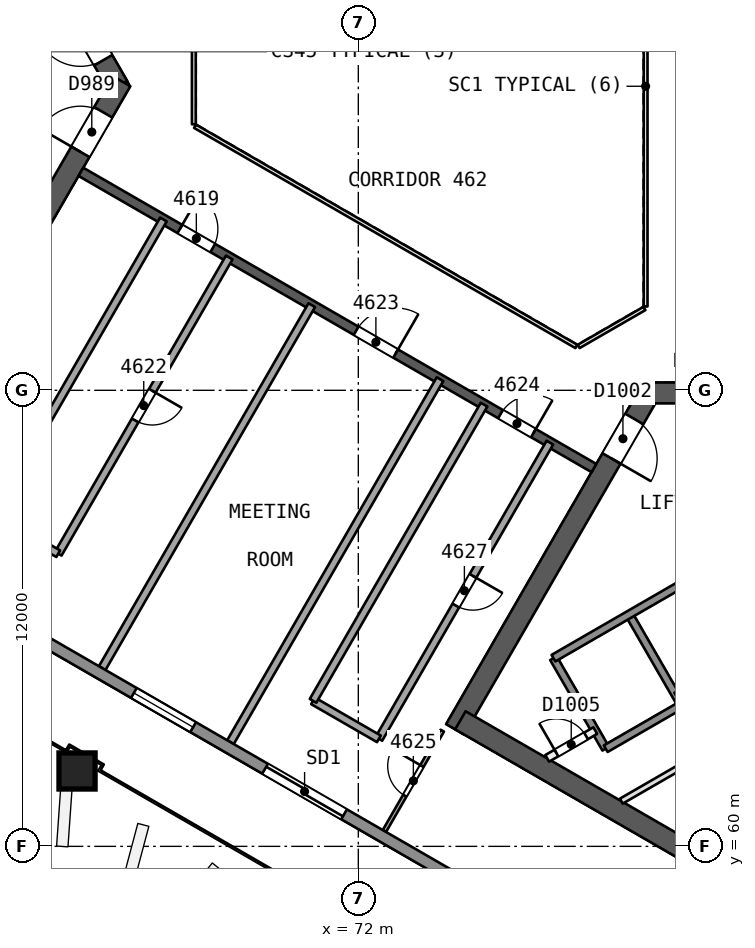
"""IFC4 building model, lengths in metres.
Left out: names, types, materials, properties, quantities, classifications, styles, units other than length and angle.
Written with IfcOpenShell. Run it as: python <this file> out.ifc"""

import sys

from ifc_helpers import new_model, si_unit, direction, frame, frame_2d, origin, origin_2d, place, context, subcontext, project, spatial, rectangle, extrude, element, fill, save


model = new_model("IFC4")
c1 = context("Model", 3, precision=1e-05, world=origin(), true_north=direction((0.0, 1.0)))
c2 = subcontext(c1, "Body", "Model", "MODEL_VIEW")
j1 = project(units=[si_unit("LENGTHUNIT", "METRE"), si_unit("PLANEANGLEUNIT", "RADIAN")], contexts=[c1])
p1 = place(None, origin())
s1 = spatial("IfcSite", under=j1, at=p1, CompositionType="ELEMENT")
p2 = place(p1, origin())
s2 = spatial("IfcBuilding", under=s1, at=p2, CompositionType="ELEMENT")
p3 = place(p2, frame((0.0, 0.0, 189.6)))
s3 = spatial("IfcBuildingStorey", under=s2, at=p3, CompositionType="ELEMENT", Elevation=189.6)
p4 = place(p3, frame((65.682, 80.0, 0.0), z_axis=(0.0, 0.0, 1.0), x_axis=(-0.500000202252, 0.866025287014, 0.0)))
e1 = element("IfcWall", 1, at=p4, inside=s3, PredefinedType="SHEAR", context=c2, shape_type="SweptSolid", body=[
    extrude(rectangle(XDim=10.221, YDim=0.55, at=frame_2d((5.111, 0.0))), origin(), (0.0, 0.0, 1.0), 3.7),
])
p5 = place(p4, frame((0.791, 0.0, 0.0)))
e2 = element("IfcOpeningElement", 2, at=p5, cuts=e1, PredefinedType="OPENING", context=c2, shape_type="SweptSolid", body=[
    extrude(rectangle(XDim=1.2, YDim=2.1, at=frame_2d((0.6, 1.05))), frame((0.0, 0.286, 0.0), z_axis=(0.0, -1.0, 0.0), x_axis=(1.0, 0.0, 0.0)), (0.0, 0.0, 1.0), 0.571),
])
p6 = place(p3, frame((60.709, 71.386, 0.0), z_axis=(0.0, 0.0, 1.0), x_axis=(0.500015938302, 0.866016201606, 0.0)))
e3 = element("IfcWall", 3, at=p6, inside=s3, PredefinedType="SHEAR", context=c2, shape_type="SweptSolid", body=[
    extrude(rectangle(XDim=10.105, YDim=0.55, at=frame_2d((5.053, 0.0))), origin(), (0.0, 0.0, 1.0), 3.7),
])
p7 = place(p6, frame((7.955, 0.0, 0.0)))
e4 = element("IfcOpeningElement", 4, at=p7, cuts=e3, PredefinedType="OPENING", context=c2, shape_type="SweptSolid", body=[
    extrude(rectangle(XDim=1.2, YDim=2.1, at=frame_2d((0.6, 1.05))), frame((0.0, 0.286, 0.0), z_axis=(0.0, -1.0, 0.0), x_axis=(1.0, 0.0, 0.0)), (0.0, 0.0, 1.0), 0.571),
])
p8 = place(p3, frame((79.659, 71.931, 0.0), z_axis=(0.0, 0.0, 1.0), x_axis=(-0.500000202252, -0.866025287014, 0.0)))
e5 = element("IfcWall", 5, at=p8, inside=s3, PredefinedType="SHEAR", context=c2, shape_type="SweptSolid", body=[
    extrude(rectangle(XDim=10.221, YDim=0.55, at=frame_2d((5.111, 0.0))), origin(), (0.0, 0.0, 1.0), 3.7),
])
p9 = place(p8, frame((0.791, 0.0, 0.0)))
e6 = element("IfcOpeningElement", 6, at=p9, cuts=e5, PredefinedType="OPENING", context=c2, shape_type="SweptSolid", body=[
    extrude(rectangle(XDim=1.2, YDim=2.1, at=frame_2d((0.6, 1.05))), frame((0.0, 0.286, 0.0), z_axis=(0.0, -1.0, 0.0), x_axis=(1.0, 0.0, 0.0)), (0.0, 0.0, 1.0), 0.571),
])
p10 = place(p3, frame((74.686, 63.317, 0.0), z_axis=(0.0, 0.0, 1.0), x_axis=(0.866024505738, -0.500001555459, 0.0)))
e7 = element("IfcWall", 7, at=p10, inside=s3, PredefinedType="SHEAR", context=c2, shape_type="SweptSolid", body=[
    extrude(rectangle(XDim=14.059, YDim=0.55, at=frame_2d((7.029, 0.0))), origin(), (0.0, 0.0, 1.0), 3.7),
])
p11 = place(p3, frame((89.605, 71.931, 0.0), z_axis=(0.0, 0.0, 1.0), x_axis=(-1.0, 0.0, 0.0)))
e8 = element("IfcWall", 8, at=p11, inside=s3, PredefinedType="SHEAR", context=c2, shape_type="SweptSolid", body=[
    extrude(rectangle(XDim=10.105, YDim=0.55, at=frame_2d((5.052, 0.0))), origin(), (0.0, 0.0, 1.0), 3.7),
])
p12 = place(p11, frame((7.955, 0.0, 0.0)))
e9 = element("IfcOpeningElement", 9, at=p12, cuts=e8, PredefinedType="OPENING", context=c2, shape_type="SweptSolid", body=[
    extrude(rectangle(XDim=1.2, YDim=2.1, at=frame_2d((0.6, 1.05))), frame((0.0, 0.286, 0.0), z_axis=(0.0, -1.0, 0.0), x_axis=(1.0, 0.0, 0.0)), (0.0, 0.0, 1.0), 0.571),
])
p13 = place(p3, frame((64.7, 77.748, 0.0), z_axis=(0.0, 0.0, 1.0), x_axis=(0.866026492143, -0.499998114903, 0.0)))
e10 = element("IfcWall", 10, at=p13, inside=s3, PredefinedType="SHEAR", context=c2, shape_type="SweptSolid", body=[
    extrude(rectangle(XDim=15.588, YDim=0.25, at=frame_2d((7.794, 0.0))), origin(), (0.0, 0.0, 1.0), 3.25),
])
p14 = place(p13, frame((3.007, 0.0, 0.0)))
e11 = element("IfcOpeningElement", 11, at=p14, cuts=e10, PredefinedType="OPENING", context=c2, shape_type="SweptSolid", body=[
    extrude(rectangle(XDim=1.0, YDim=2.1, at=frame_2d((0.5, 1.05))), frame((0.0, 0.135, 0.0), z_axis=(0.0, -1.0, 0.0), x_axis=(1.0, 0.0, 0.0)), (0.0, 0.0, 1.0), 0.271),
])
p15 = place(p13, frame((8.363, 0.0, 0.0)))
e12 = element("IfcOpeningElement", 12, at=p15, cuts=e10, PredefinedType="OPENING", context=c2, shape_type="SweptSolid", body=[
    extrude(rectangle(XDim=1.2, YDim=2.4, at=frame_2d((0.6, 1.2))), frame((0.0, 0.135, 0.0), z_axis=(0.0, -1.0, 0.0), x_axis=(1.0, 0.0, 0.0)), (0.0, 0.0, 1.0), 0.271),
])
p16 = place(p13, frame((12.75, 0.0, 0.0)))
e13 = element("IfcOpeningElement", 13, at=p16, cuts=e10, PredefinedType="OPENING", context=c2, shape_type="SweptSolid", body=[
    extrude(rectangle(XDim=1.0, YDim=2.1, at=frame_2d((0.5, 1.05))), frame((0.0, 0.135, 0.0), z_axis=(0.0, -1.0, 0.0), x_axis=(1.0, 0.0, 0.0)), (0.0, 0.0, 1.0), 0.271),
])
p17 = place(p3, frame((64.586, 61.963, 0.0), z_axis=(0.010093620709, 0.017482414954, 0.999796221231), x_axis=(-0.499912926478, -0.865840372083, 0.020187025823)))
e14 = element("IfcColumn", 14, at=p17, inside=s3, PredefinedType="COLUMN", context=c2, shape_type="SweptSolid", body=[
    extrude(rectangle(XDim=0.95, YDim=0.95, at=origin_2d()), origin(), (0.0, 0.0, 1.0), 3.701),
])
p18 = place(p3, frame((68.604, 75.495, 0.0), z_axis=(0.0, 0.0, 1.0), x_axis=(-0.5000018851, -0.866024315419, 0.0)))
e15 = element("IfcWall", 15, at=p18, inside=s3, PredefinedType="PARTITIONING", context=c2, shape_type="SweptSolid", body=[
    extrude(rectangle(XDim=9.0, YDim=0.2, at=frame_2d((4.5, 0.0))), origin(), (0.0, 0.0, 1.0), 3.25),
])
p19 = place(p18, frame((4.05, 0.0, 0.0)))
e16 = element("IfcOpeningElement", 16, at=p19, cuts=e15, PredefinedType="OPENING", context=c2, shape_type="SweptSolid", body=[
    extrude(rectangle(XDim=0.9, YDim=2.1, at=frame_2d((0.45, 1.05))), frame((0.0, 0.11, 0.0), z_axis=(0.0, -1.0, 0.0), x_axis=(1.0, 0.0, 0.0)), (0.0, 0.0, 1.0), 0.221),
])
p20 = place(p3, frame((64.104, 67.7, 0.0), z_axis=(0.0, 0.0, 1.0), x_axis=(-0.866010750942, 0.50002537861, 0.0)))
e17 = element("IfcWall", 17, at=p20, inside=s3, PredefinedType="PARTITIONING", context=c2, shape_type="SweptSolid", body=[
    extrude(rectangle(XDim=2.0, YDim=0.2, at=frame_2d((1.0, 0.0))), origin(), (0.0, 0.0, 1.0), 3.25),
])
p21 = place(p3, frame((62.372, 68.7, 0.0), z_axis=(0.0, 0.0, 1.0), x_axis=(0.5000018851, 0.866024315419, 0.0)))
e18 = element("IfcWall", 18, at=p21, inside=s3, PredefinedType="PARTITIONING", context=c2, shape_type="SweptSolid", body=[
    extrude(rectangle(XDim=9.0, YDim=0.2, at=frame_2d((4.5, 0.0))), origin(), (0.0, 0.0, 1.0), 3.25),
])
for number, where, z_axis, x_axis in (
    (19, (65.26, 64.69, 0.0), (0.0, 0.0, 1.0), (0.5, 0.866, 0.0)),
    (20, (68.635, 62.741, 0.0), (0.0, 0.0, 1.0), (0.5, 0.866, 0.0)),
):
    element("IfcWall", number, at=place(p3, frame(where, z_axis=z_axis, x_axis=x_axis)), inside=s3, PredefinedType="PARTITIONING", context=c2, shape_type="SweptSolid", body=[
        extrude(rectangle(XDim=11.029, YDim=0.2, at=frame_2d((5.514, 0.0))), origin(), (0.0, 0.0, 1.0), 3.25),
    ])
p22 = place(p3, frame((72.686, 60.403, 0.0), z_axis=(0.0, 0.0, 1.0), x_axis=(0.499978833458, 0.866037623948, 0.0)))
e21 = element("IfcWall", 21, at=p22, inside=s3, PredefinedType="PARTITIONING", context=c2, shape_type="SweptSolid", body=[
    extrude(rectangle(XDim=3.05, YDim=0.1, at=frame_2d((1.525, 0.0))), origin(), (0.0, 0.0, 1.0), 3.25),
])
p23 = place(p22, frame((1.075, 0.0, 0.0)))
e22 = element("IfcOpeningElement", 22, at=p23, cuts=e21, PredefinedType="OPENING", context=c2, shape_type="SweptSolid", body=[
    extrude(rectangle(XDim=0.9, YDim=2.1, at=frame_2d((0.45, 1.05))), frame((0.0, 0.061, 0.0), z_axis=(0.0, -1.0, 0.0), x_axis=(1.0, 0.0, 0.0)), (0.0, 0.0, 1.0), 0.121),
])
p24 = place(p3, frame((77.041, 70.623, 0.0), z_axis=(0.0, 0.0, 1.0), x_axis=(-0.5000018851, -0.866024315419, 0.0)))
e23 = element("IfcWall", 23, at=p24, inside=s3, PredefinedType="PARTITIONING", context=c2, shape_type="SweptSolid", body=[
    extrude(rectangle(XDim=9.0, YDim=0.2, at=frame_2d((4.5, 0.0))), origin(), (0.0, 0.0, 1.0), 3.25),
])
p25 = place(p24, frame((4.05, 0.0, 0.0)))
e24 = element("IfcOpeningElement", 24, at=p25, cuts=e23, PredefinedType="OPENING", context=c2, shape_type="SweptSolid", body=[
    extrude(rectangle(XDim=0.9, YDim=2.1, at=frame_2d((0.45, 1.05))), frame((0.0, 0.11, 0.0), z_axis=(0.0, -1.0, 0.0), x_axis=(1.0, 0.0, 0.0)), (0.0, 0.0, 1.0), 0.221),
])
p26 = place(p3, frame((72.541, 62.829, 0.0), z_axis=(0.0, 0.0, 1.0), x_axis=(-0.866010750942, 0.50002537861, 0.0)))
e25 = element("IfcWall", 25, at=p26, inside=s3, PredefinedType="PARTITIONING", context=c2, shape_type="SweptSolid", body=[
    extrude(rectangle(XDim=2.0, YDim=0.2, at=frame_2d((1.0, 0.0))), origin(), (0.0, 0.0, 1.0), 3.25),
])
p27 = place(p3, frame((70.809, 63.829, 0.0), z_axis=(0.0, 0.0, 1.0), x_axis=(0.5000018851, 0.866024315419, 0.0)))
e26 = element("IfcWall", 26, at=p27, inside=s3, PredefinedType="PARTITIONING", context=c2, shape_type="SweptSolid", body=[
    extrude(rectangle(XDim=9.0, YDim=0.2, at=frame_2d((4.5, 0.0))), origin(), (0.0, 0.0, 1.0), 3.25),
])
p28 = place(p3, frame((88.621, 51.031, 0.0), z_axis=(0.0, 0.0, 1.0), x_axis=(-0.866025007541, 0.500000686313, 0.0)))
e27 = element("IfcWall", 27, at=p28, inside=s3, PredefinedType="SOLIDWALL", context=c2, shape_type="SweptSolid", body=[
    extrude(rectangle(XDim=52.562, YDim=0.3, at=frame_2d((26.281, 0.0))), origin(), (0.0, 0.0, 1.0), 3.25),
])
p29 = place(p28, frame((29.367, 0.0, 0.0)))
e28 = element("IfcOpeningElement", 28, at=p29, cuts=e27, PredefinedType="OPENING", context=c2, shape_type="SweptSolid", body=[
    extrude(rectangle(XDim=2.4, YDim=2.4, at=frame_2d((1.2, 1.2))), frame((0.0, 0.161, 0.0), z_axis=(0.0, -1.0, 0.0), x_axis=(1.0, 0.0, 0.0)), (0.0, 0.0, 1.0), 0.321),
])
p30 = place(p28, frame((40.864, 0.0, 0.0)))
e29 = element("IfcOpeningElement", 29, at=p30, cuts=e27, PredefinedType="OPENING", context=c2, shape_type="SweptSolid", body=[
    extrude(rectangle(XDim=2.4, YDim=2.4, at=frame_2d((1.2, 1.2))), frame((0.0, 0.161, 0.0), z_axis=(0.0, -1.0, 0.0), x_axis=(1.0, 0.0, 0.0)), (0.0, 0.0, 1.0), 0.321),
])
p31 = place(p28, frame((19.625, 0.0, 0.0)))
e30 = element("IfcOpeningElement", 30, at=p31, cuts=e27, PredefinedType="OPENING", context=c2, shape_type="SweptSolid", body=[
    extrude(rectangle(XDim=2.4, YDim=2.4, at=frame_2d((1.2, 1.2))), frame((0.0, 0.161, 0.0), z_axis=(0.0, -1.0, 0.0), x_axis=(1.0, 0.0, 0.0)), (0.0, 0.0, 1.0), 0.321),
])
p32 = place(p28, frame((9.277, 0.0, 0.0)))
e31 = element("IfcOpeningElement", 31, at=p32, cuts=e27, PredefinedType="OPENING", context=c2, shape_type="SweptSolid", body=[
    extrude(rectangle(XDim=2.4, YDim=2.4, at=frame_2d((1.2, 1.2))), frame((0.0, 0.161, 0.0), z_axis=(0.0, -1.0, 0.0), x_axis=(1.0, 0.0, 0.0)), (0.0, 0.0, 1.0), 0.321),
])
p33 = place(p28, frame((24.212, 0.0, 0.9)))
e32 = element("IfcOpeningElement", 32, at=p33, cuts=e27, PredefinedType="OPENING", context=c2, shape_type="SweptSolid", body=[
    extrude(rectangle(XDim=1.8, YDim=1.5, at=frame_2d((0.9, 0.75))), frame((0.0, 0.161, 0.0), z_axis=(0.0, -1.0, 0.0), x_axis=(1.0, 0.0, 0.0)), (0.0, 0.0, 1.0), 0.321),
])
for number, where, z_axis, x_axis in (
    (33, (77.135, 64.952, 0.0), (0.0, 0.0, 1.0), (0.5, -0.866, 0.0)),
    (34, (79.127, 66.102, 0.0), (0.0, 0.0, 1.0), (0.5, -0.866, 0.0)),
):
    element("IfcWall", number, at=place(p3, frame(where, z_axis=z_axis, x_axis=x_axis)), inside=s3, PredefinedType="SOLIDWALL", context=c2, shape_type="SweptSolid", body=[
        extrude(rectangle(XDim=2.75, YDim=0.2, at=frame_2d((1.375, 0.0))), origin(), (0.0, 0.0, 1.0), 3.25),
    ])
p34 = place(p3, frame((77.135, 64.952, 0.0), z_axis=(0.0, 0.0, 1.0), x_axis=(0.866031916153, 0.499988720078, 0.0)))
e35 = element("IfcWall", 35, at=p34, inside=s3, PredefinedType="SOLIDWALL", context=c2, shape_type="SweptSolid", body=[
    extrude(rectangle(XDim=11.35, YDim=0.2, at=frame_2d((5.675, 0.0))), origin(), (0.0, 0.0, 1.0), 3.25),
])
p35 = place(p3, frame((76.97, 62.316, 0.0), z_axis=(0.0, 0.0, 1.0), x_axis=(0.865982457891, 0.500074377092, 0.0)))
e36 = element("IfcWall", 36, at=p35, inside=s3, PredefinedType="PARTITIONING", context=c2, shape_type="SweptSolid", body=[
    extrude(rectangle(XDim=1.461, YDim=0.2, at=frame_2d((0.73, 0.0))), origin(), (0.0, 0.0, 1.0), 3.25),
])
p36 = place(p35, frame((0.281, 0.0, 0.0)))
e37 = element("IfcOpeningElement", 37, at=p36, cuts=e36, PredefinedType="OPENING", context=c2, shape_type="SweptSolid", body=[
    extrude(rectangle(XDim=0.9, YDim=2.1, at=frame_2d((0.45, 1.05))), frame((0.0, 0.11, 0.0), z_axis=(0.0, -1.0, 0.0), x_axis=(1.0, 0.0, 0.0)), (0.0, 0.0, 1.0), 0.221),
])
p37 = place(p3, frame((80.367, 63.954, 0.0), z_axis=(0.0, 0.0, 1.0), x_axis=(0.866026575979, 0.499997969693, 0.0)))
e38 = element("IfcWall", 38, at=p37, inside=s3, PredefinedType="SOLIDWALL", context=c2, shape_type="SweptSolid", body=[
    extrude(rectangle(XDim=6.75, YDim=0.2, at=frame_2d((3.375, 0.0))), origin(), (0.0, 0.0, 1.0), 3.25),
])
p38 = place(p3, frame((78.51, 62.57, 0.0), z_axis=(0.0, 0.0, 1.0), x_axis=(0.866053019151, 0.499952165731, 0.0)))
e39 = element("IfcWall", 39, at=p38, inside=s3, PredefinedType="SOLIDWALL", context=c2, shape_type="SweptSolid", body=[
    extrude(rectangle(XDim=2.3, YDim=0.2, at=frame_2d((1.15, 0.0))), origin(), (0.0, 0.0, 1.0), 3.25),
])
p39 = place(p3, frame((78.92, 61.19, 0.0), z_axis=(0.0, 0.0, 1.0), x_axis=(0.866038211682, 0.499977815414, 0.0)))
e40 = element("IfcWall", 40, at=p39, inside=s3, PredefinedType="PARTITIONING", context=c2, shape_type="SweptSolid", body=[
    extrude(rectangle(XDim=2.51, YDim=0.15, at=frame_2d((1.255, 0.0))), origin(), (0.0, 0.0, 1.0), 3.25),
])
p40 = place(p3, frame((79.56, 74.206, 0.0), z_axis=(0.0, 0.0, 1.0), x_axis=(0.0, 1.0, 0.0)))
e41 = element("IfcWall", 41, at=p40, inside=s3, PredefinedType="PARTITIONING", context=c2, shape_type="SweptSolid", body=[
    extrude(rectangle(XDim=11.588, YDim=0.1, at=frame_2d((5.794, 0.0))), origin(), (0.0, 0.0, 1.0), 3.25),
])
p41 = place(p3, frame((67.672, 81.0, 0.0), z_axis=(0.0, 0.0, 1.0), x_axis=(0.0, -1.0, 0.0)))
e42 = element("IfcWall", 42, at=p41, inside=s3, PredefinedType="PARTITIONING", context=c2, shape_type="SweptSolid", body=[
    extrude(rectangle(XDim=2.0, YDim=0.1, at=frame_2d((1.0, 0.0))), origin(), (0.0, 0.0, 1.0), 3.25),
])
p42 = place(p3, frame((67.702, 78.948, 0.0), z_axis=(0.0, 0.0, 1.0), x_axis=(0.866026658274, -0.499997827154, 0.0)))
e43 = element("IfcWall", 43, at=p42, inside=s3, PredefinedType="PARTITIONING", context=c2, shape_type="SweptSolid", body=[
    extrude(rectangle(XDim=11.588, YDim=0.1, at=frame_2d((5.794, 0.0))), origin(), (0.0, 0.0, 1.0), 3.25),
])
p43 = place(p3, frame((77.798, 73.154, 0.0), z_axis=(0.0, 0.0, 1.0), x_axis=(0.866041268327, 0.499972520799, 0.0)))
e44 = element("IfcWall", 44, at=p43, inside=s3, PredefinedType="PARTITIONING", context=c2, shape_type="SweptSolid", body=[
    extrude(rectangle(XDim=2.0, YDim=0.1, at=frame_2d((1.0, 0.0))), origin(), (0.0, 0.0, 1.0), 3.25),
])
p44 = place(p14, origin())
e45 = element("IfcDoor", 45, at=p44, inside=s3, OperationType="SINGLE_SWING_LEFT", PredefinedType="NOTDEFINED", context=c2, shape_type="SweptSolid", body=[
    extrude(rectangle(XDim=1.0, YDim=2.1, at=frame_2d((0.5, 1.05))), frame((0.0, 0.025, 0.0), z_axis=(0.0, -1.0, 0.0), x_axis=(1.0, 0.0, 0.0)), (0.0, 0.0, 1.0), 0.05),
])
fill(e11, e45)
p45 = place(p19, origin())
e46 = element("IfcDoor", 46, at=p45, inside=s3, OperationType="SINGLE_SWING_LEFT", PredefinedType="NOTDEFINED", context=c2, shape_type="SweptSolid", body=[
    extrude(rectangle(XDim=0.9, YDim=2.1, at=frame_2d((0.45, 1.05))), frame((0.0, 0.025, 0.0), z_axis=(0.0, -1.0, 0.0), x_axis=(1.0, 0.0, 0.0)), (0.0, 0.0, 1.0), 0.05),
])
fill(e16, e46)
p46 = place(p15, origin())
e47 = element("IfcDoor", 47, at=p46, inside=s3, OperationType="SINGLE_SWING_RIGHT", PredefinedType="NOTDEFINED", context=c2, shape_type="SweptSolid", body=[
    extrude(rectangle(XDim=1.2, YDim=2.4, at=frame_2d((0.6, 1.2))), frame((0.0, 0.025, 0.0), z_axis=(0.0, -1.0, 0.0), x_axis=(1.0, 0.0, 0.0)), (0.0, 0.0, 1.0), 0.05),
])
fill(e12, e47)
p47 = place(p16, origin())
e48 = element("IfcDoor", 48, at=p47, inside=s3, OperationType="SINGLE_SWING_RIGHT", PredefinedType="NOTDEFINED", context=c2, shape_type="SweptSolid", body=[
    extrude(rectangle(XDim=1.0, YDim=2.1, at=frame_2d((0.5, 1.05))), frame((0.0, 0.025, 0.0), z_axis=(0.0, -1.0, 0.0), x_axis=(1.0, 0.0, 0.0)), (0.0, 0.0, 1.0), 0.05),
])
fill(e13, e48)
p48 = place(p23, origin())
e49 = element("IfcDoor", 49, at=p48, inside=s3, OperationType="SINGLE_SWING_RIGHT", PredefinedType="NOTDEFINED", context=c2, shape_type="SweptSolid", body=[
    extrude(rectangle(XDim=0.9, YDim=2.1, at=frame_2d((0.45, 1.05))), frame((0.0, 0.025, 0.0), z_axis=(0.0, -1.0, 0.0), x_axis=(1.0, 0.0, 0.0)), (0.0, 0.0, 1.0), 0.05),
])
fill(e22, e49)
p49 = place(p25, origin())
e50 = element("IfcDoor", 50, at=p49, inside=s3, OperationType="SINGLE_SWING_LEFT", PredefinedType="NOTDEFINED", context=c2, shape_type="SweptSolid", body=[
    extrude(rectangle(XDim=0.9, YDim=2.1, at=frame_2d((0.45, 1.05))), frame((0.0, 0.025, 0.0), z_axis=(0.0, -1.0, 0.0), x_axis=(1.0, 0.0, 0.0)), (0.0, 0.0, 1.0), 0.05),
])
fill(e24, e50)
p50 = place(p31, origin())
e51 = element("IfcDoor", 51, at=p50, inside=s3, OperationType="SLIDING_TO_LEFT", PredefinedType="NOTDEFINED", context=c2, shape_type="SweptSolid", body=[
    extrude(rectangle(XDim=2.4, YDim=2.4, at=frame_2d((1.2, 1.2))), frame((0.0, 0.025, 0.0), z_axis=(0.0, -1.0, 0.0), x_axis=(1.0, 0.0, 0.0)), (0.0, 0.0, 1.0), 0.05),
])
fill(e30, e51)
p51 = place(p33, origin())
e52 = element("IfcWindow", 52, at=p51, inside=s3, PartitioningType="SINGLE_PANEL", PredefinedType="WINDOW", context=c2, shape_type="SweptSolid", body=[
    extrude(rectangle(XDim=1.8, YDim=1.5, at=frame_2d((0.9, 0.75))), frame((0.0, 0.03, 0.0), z_axis=(0.0, -1.0, 0.0), x_axis=(1.0, 0.0, 0.0)), (0.0, 0.0, 1.0), 0.06),
])
fill(e32, e52)
p52 = place(p5, origin())
e53 = element("IfcDoor", 53, at=p52, inside=s3, OperationType="SINGLE_SWING_RIGHT", PredefinedType="NOTDEFINED", context=c2, shape_type="SweptSolid", body=[
    extrude(rectangle(XDim=1.2, YDim=2.1, at=frame_2d((0.6, 1.05))), frame((0.0, 0.025, 0.0), z_axis=(0.0, -1.0, 0.0), x_axis=(1.0, 0.0, 0.0)), (0.0, 0.0, 1.0), 0.05),
])
fill(e2, e53)
p53 = place(p7, origin())
e54 = element("IfcDoor", 54, at=p53, inside=s3, OperationType="SINGLE_SWING_LEFT", PredefinedType="NOTDEFINED", context=c2, shape_type="SweptSolid", body=[
    extrude(rectangle(XDim=1.2, YDim=2.1, at=frame_2d((0.6, 1.05))), frame((0.0, 0.025, 0.0), z_axis=(0.0, -1.0, 0.0), x_axis=(1.0, 0.0, 0.0)), (0.0, 0.0, 1.0), 0.05),
])
fill(e4, e54)
p54 = place(p9, origin())
e55 = element("IfcDoor", 55, at=p54, inside=s3, OperationType="SINGLE_SWING_RIGHT", PredefinedType="NOTDEFINED", context=c2, shape_type="SweptSolid", body=[
    extrude(rectangle(XDim=1.2, YDim=2.1, at=frame_2d((0.6, 1.05))), frame((0.0, 0.025, 0.0), z_axis=(0.0, -1.0, 0.0), x_axis=(1.0, 0.0, 0.0)), (0.0, 0.0, 1.0), 0.05),
])
fill(e6, e55)
p55 = place(p36, origin())
e56 = element("IfcDoor", 56, at=p55, inside=s3, OperationType="SINGLE_SWING_LEFT", PredefinedType="NOTDEFINED", context=c2, shape_type="SweptSolid", body=[
    extrude(rectangle(XDim=0.9, YDim=2.1, at=frame_2d((0.45, 1.05))), frame((0.0, 0.025, 0.0), z_axis=(0.0, -1.0, 0.0), x_axis=(1.0, 0.0, 0.0)), (0.0, 0.0, 1.0), 0.05),
])
fill(e37, e56)
save(model, sys.argv[1])
